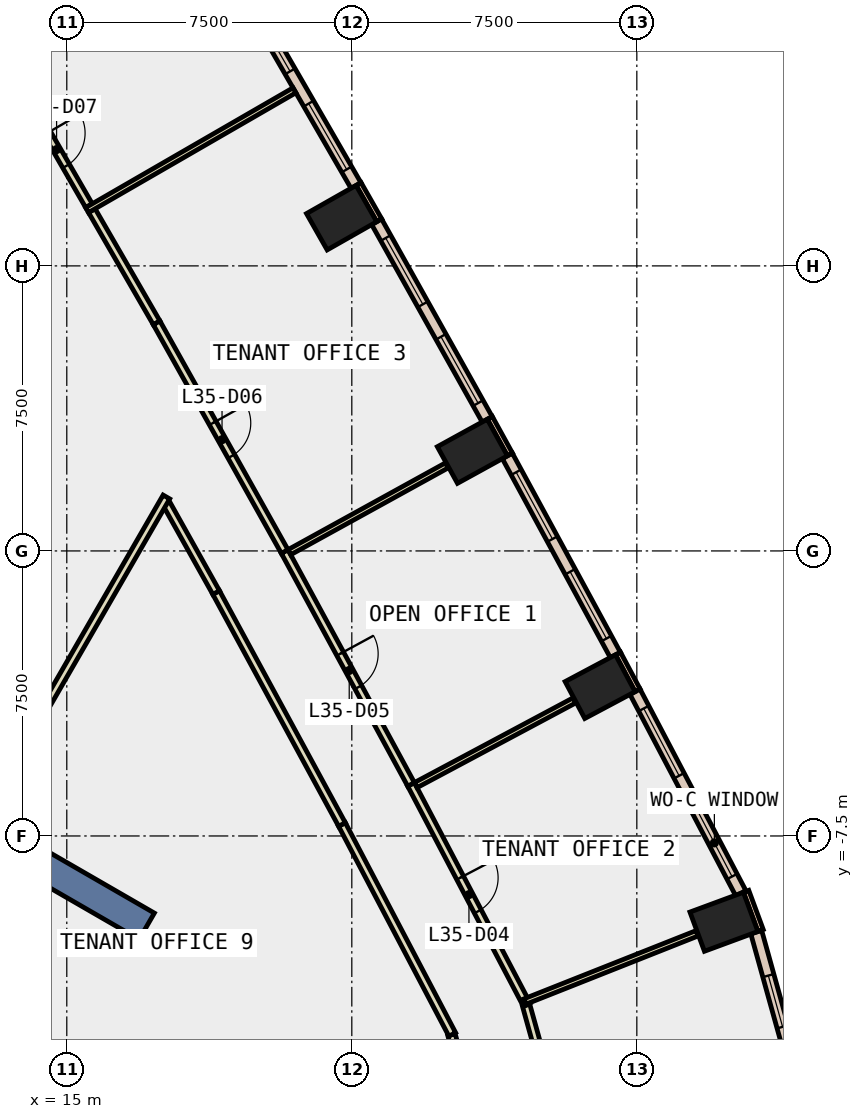
"""IFC4 building model, lengths in metres.
Left out: names, types, materials, properties, quantities, classifications, styles, units other than length and angle.
Written with IfcOpenShell. Run it as: python <this file> out.ifc"""

import sys

from ifc_helpers import new_model, si_unit, direction, frame, frame_2d, origin, origin_2d, place, context, subcontext, project, spatial, rectangle, extrude, element, fill, save


model = new_model("IFC4")
c1 = context("Model", 3, precision=1e-05, world=origin(), true_north=direction((0.0, 1.0)))
c2 = subcontext(c1, "Body", "Model", "MODEL_VIEW")
j1 = project(units=[si_unit("LENGTHUNIT", "METRE"), si_unit("PLANEANGLEUNIT", "RADIAN")], contexts=[c1])
p1 = place(None, origin())
s1 = spatial("IfcSite", under=j1, at=p1, CompositionType="ELEMENT")
p2 = place(p1, origin())
s2 = spatial("IfcBuilding", under=s1, at=p2, CompositionType="ELEMENT")
p3 = place(p2, frame((0.0, 0.0, 159.2)))
s3 = spatial("IfcBuildingStorey", under=s2, at=p3, CompositionType="ELEMENT", Elevation=159.2)
for number, where, z_axis, x_axis in (
    (1, (32.292, -9.758, -0.4), (0.0, 0.0, 1.0), (-0.347, 0.938, 0.0)),
    (2, (29.034, -3.571, -0.4), (0.0, 0.0, 1.0), (-0.47, 0.883, 0.0)),
    (3, (25.673, 2.622, -0.4), (0.0, 0.0, 1.0), (-0.482, 0.876, 0.0)),
    (4, (22.232, 8.769, -0.4), (0.0, 0.0, 1.0), (-0.494, 0.869, 0.0)),
):
    element("IfcColumn", number, at=place(p3, frame(where, z_axis=z_axis, x_axis=x_axis)), inside=s3, PredefinedType="COLUMN", context=c2, shape_type="SweptSolid", body=[
        extrude(rectangle(XDim=1.1, YDim=1.5, at=origin_2d()), origin(), (0.0, 0.0, 1.0), 4.2),
    ])
p4 = place(p3, frame((9.31, -5.375, -0.4), z_axis=(0.0, 0.0, 1.0), x_axis=(0.866017533419, -0.500013631625, 0.0)))
e5 = element("IfcWall", 5, at=p4, inside=s3, PredefinedType="SHEAR", context=c2, shape_type="SweptSolid", body=[
    extrude(rectangle(XDim=9.0, YDim=0.8, at=frame_2d((4.5, 0.0))), origin(), (0.0, 0.0, 1.0), 4.2),
])
for number, where, z_axis, x_axis in (
    (6, (33.256, -9.988, 0.0), (0.0, 0.0, 1.0), (-0.346, 0.938, 0.0)),
    (7, (30.02, -3.669, 0.0), (0.0, 0.0, 1.0), (-0.47, 0.883, 0.0)),
):
    element("IfcWall", number, at=place(p3, frame(where, z_axis=z_axis, x_axis=x_axis)), inside=s3, PredefinedType="STANDARD", context=c2, shape_type="SweptSolid", body=[
        extrude(rectangle(XDim=1.1, YDim=0.15, at=frame_2d((0.55, 0.0))), origin(), (0.0, 0.0, 1.0), 3.8),
    ])
for number, where, z_axis, x_axis in (
    (8, (26.661, 2.538, 0.0), (0.0, 0.0, 1.0), (-0.482, 0.876, 0.0)),
    (9, (23.222, 8.699, 0.0), (0.0, 0.0, 1.0), (-0.495, 0.869, 0.0)),
):
    element("IfcWall", number, at=place(p3, frame(where, z_axis=z_axis, x_axis=x_axis)), inside=s3, PredefinedType="STANDARD", context=c2, shape_type="SweptSolid", body=[
        extrude(rectangle(XDim=1.1, YDim=0.15, at=frame_2d((0.55, 0.0))), origin(), (0.0, 0.0, 1.0), 3.8),
    ])
p5 = place(p3, frame((34.154, -13.667, 0.0), z_axis=(0.0, 0.0, 1.0), x_axis=(-0.26799398221, 0.963420585985, 0.0)))
e10 = element("IfcWall", 10, at=p5, inside=s3, PredefinedType="STANDARD", context=c2, shape_type="SweptSolid", body=[
    extrude(rectangle(XDim=3.776, YDim=0.3, at=frame_2d((1.888, 0.0))), origin(), (0.0, 0.0, 1.0), 3.8),
])
p6 = place(p5, frame((1.188, 0.0, 0.9)))
e11 = element("IfcOpeningElement", 11, at=p6, cuts=e10, PredefinedType="OPENING", context=c2, shape_type="SweptSolid", body=[
    extrude(rectangle(XDim=1.4, YDim=2.6, at=frame_2d((0.7, 1.3))), frame((0.0, 0.16, 0.0), z_axis=(0.0, -1.0, 0.0), x_axis=(1.0, 0.0, 0.0)), (0.0, 0.0, 1.0), 0.32),
])
p7 = place(p3, frame((32.737, -9.008, 0.0), z_axis=(0.0, 0.0, 1.0), x_axis=(-0.465104650407, 0.885255705528, 0.0)))
e12 = element("IfcWall", 12, at=p7, inside=s3, PredefinedType="STANDARD", context=c2, shape_type="SweptSolid", body=[
    extrude(rectangle(XDim=5.99, YDim=0.3, at=frame_2d((2.995, 0.0))), origin(), (0.0, 0.0, 1.0), 3.8),
])
p8 = place(p7, frame((0.498, 0.0, 0.9)))
e13 = element("IfcOpeningElement", 13, at=p8, cuts=e12, PredefinedType="OPENING", context=c2, shape_type="SweptSolid", body=[
    extrude(rectangle(XDim=2.0, YDim=2.6, at=frame_2d((1.0, 1.3))), frame((0.0, 0.16, 0.0), z_axis=(0.0, -1.0, 0.0), x_axis=(1.0, 0.0, 0.0)), (0.0, 0.0, 1.0), 0.32),
])
p9 = place(p7, frame((3.493, 0.0, 0.9)))
e14 = element("IfcOpeningElement", 14, at=p9, cuts=e12, PredefinedType="OPENING", context=c2, shape_type="SweptSolid", body=[
    extrude(rectangle(XDim=2.0, YDim=2.6, at=frame_2d((1.0, 1.3))), frame((0.0, 0.16, 0.0), z_axis=(0.0, -1.0, 0.0), x_axis=(1.0, 0.0, 0.0)), (0.0, 0.0, 1.0), 0.32),
])
p10 = place(p3, frame((29.434, -2.736, 0.0), z_axis=(0.0, 0.0, 1.0), x_axis=(-0.476970695077, 0.878919197673, 0.0)))
e15 = element("IfcWall", 15, at=p10, inside=s3, PredefinedType="STANDARD", context=c2, shape_type="SweptSolid", body=[
    extrude(rectangle(XDim=5.958, YDim=0.3, at=frame_2d((2.979, 0.0))), origin(), (0.0, 0.0, 1.0), 3.8),
])
p11 = place(p10, frame((0.49, 0.0, 0.9)))
e16 = element("IfcOpeningElement", 16, at=p11, cuts=e15, PredefinedType="OPENING", context=c2, shape_type="SweptSolid", body=[
    extrude(rectangle(XDim=2.0, YDim=2.6, at=frame_2d((1.0, 1.3))), frame((0.0, 0.16, 0.0), z_axis=(0.0, -1.0, 0.0), x_axis=(1.0, 0.0, 0.0)), (0.0, 0.0, 1.0), 0.32),
])
p12 = place(p10, frame((3.469, 0.0, 0.9)))
e17 = element("IfcOpeningElement", 17, at=p12, cuts=e15, PredefinedType="OPENING", context=c2, shape_type="SweptSolid", body=[
    extrude(rectangle(XDim=2.0, YDim=2.6, at=frame_2d((1.0, 1.3))), frame((0.0, 0.16, 0.0), z_axis=(0.0, -1.0, 0.0), x_axis=(1.0, 0.0, 0.0)), (0.0, 0.0, 1.0), 0.32),
])
p13 = place(p3, frame((26.062, 3.463, 0.0), z_axis=(0.0, 0.0, 1.0), x_axis=(-0.488354983501, 0.872645065356, 0.0)))
e18 = element("IfcWall", 18, at=p13, inside=s3, PredefinedType="STANDARD", context=c2, shape_type="SweptSolid", body=[
    extrude(rectangle(XDim=5.957, YDim=0.3, at=frame_2d((2.978, 0.0))), origin(), (0.0, 0.0, 1.0), 3.8),
])
p14 = place(p13, frame((0.489, 0.0, 0.9)))
e19 = element("IfcOpeningElement", 19, at=p14, cuts=e18, PredefinedType="OPENING", context=c2, shape_type="SweptSolid", body=[
    extrude(rectangle(XDim=2.0, YDim=2.6, at=frame_2d((1.0, 1.3))), frame((0.0, 0.16, 0.0), z_axis=(0.0, -1.0, 0.0), x_axis=(1.0, 0.0, 0.0)), (0.0, 0.0, 1.0), 0.32),
])
p15 = place(p13, frame((3.467, 0.0, 0.9)))
e20 = element("IfcOpeningElement", 20, at=p15, cuts=e18, PredefinedType="OPENING", context=c2, shape_type="SweptSolid", body=[
    extrude(rectangle(XDim=2.0, YDim=2.6, at=frame_2d((1.0, 1.3))), frame((0.0, 0.16, 0.0), z_axis=(0.0, -1.0, 0.0), x_axis=(1.0, 0.0, 0.0)), (0.0, 0.0, 1.0), 0.32),
])
p16 = place(p3, frame((22.61, 9.615, 0.0), z_axis=(0.0, 0.0, 1.0), x_axis=(-0.500061823953, 0.865989706766, 0.0)))
e21 = element("IfcWall", 21, at=p16, inside=s3, PredefinedType="STANDARD", context=c2, shape_type="SweptSolid", body=[
    extrude(rectangle(XDim=5.957, YDim=0.3, at=frame_2d((2.979, 0.0))), origin(), (0.0, 0.0, 1.0), 3.8),
])
p17 = place(p16, frame((0.489, 0.0, 0.9)))
e22 = element("IfcOpeningElement", 22, at=p17, cuts=e21, PredefinedType="OPENING", context=c2, shape_type="SweptSolid", body=[
    extrude(rectangle(XDim=2.0, YDim=2.6, at=frame_2d((1.0, 1.3))), frame((0.0, 0.16, 0.0), z_axis=(0.0, -1.0, 0.0), x_axis=(1.0, 0.0, 0.0)), (0.0, 0.0, 1.0), 0.32),
])
p18 = place(p16, frame((3.468, 0.0, 0.9)))
e23 = element("IfcOpeningElement", 23, at=p18, cuts=e21, PredefinedType="OPENING", context=c2, shape_type="SweptSolid", body=[
    extrude(rectangle(XDim=2.0, YDim=2.6, at=frame_2d((1.0, 1.3))), frame((0.0, 0.16, 0.0), z_axis=(0.0, -1.0, 0.0), x_axis=(1.0, 0.0, 0.0)), (0.0, 0.0, 1.0), 0.32),
])
p19 = place(p3, frame((25.586, -14.393, 0.0), z_axis=(0.0, 0.0, 1.0), x_axis=(-0.268139825244, 0.963380005044, 0.0)))
e24 = element("IfcWall", 24, at=p19, inside=s3, PredefinedType="PARTITIONING", context=c2, shape_type="SweptSolid", body=[
    extrude(rectangle(XDim=1.726, YDim=0.2, at=frame_2d((0.863, 0.0))), origin(), (0.0, 0.0, 1.0), 3.8),
])
p20 = place(p3, frame((25.143, -12.722, 0.0), z_axis=(0.0, 0.0, 1.0), x_axis=(-0.465089990515, 0.885263407536, 0.0)))
e25 = element("IfcWall", 25, at=p20, inside=s3, PredefinedType="PARTITIONING", context=c2, shape_type="SweptSolid", body=[
    extrude(rectangle(XDim=6.24, YDim=0.2, at=frame_2d((3.12, 0.0))), origin(), (0.0, 0.0, 1.0), 3.8),
])
p21 = place(p3, frame((22.241, -7.198, 0.0), z_axis=(0.0, 0.0, 1.0), x_axis=(-0.476865268044, 0.878976402489, 0.0)))
e26 = element("IfcWall", 26, at=p21, inside=s3, PredefinedType="PARTITIONING", context=c2, shape_type="SweptSolid", body=[
    extrude(rectangle(XDim=6.943, YDim=0.2, at=frame_2d((3.472, 0.0))), origin(), (0.0, 0.0, 1.0), 3.8),
])
p22 = place(p3, frame((18.93, -1.095, 0.0), z_axis=(0.0, 0.0, 1.0), x_axis=(-0.488268004118, 0.872693735599, 0.0)))
e27 = element("IfcWall", 27, at=p22, inside=s3, PredefinedType="PARTITIONING", context=c2, shape_type="SweptSolid", body=[
    extrude(rectangle(XDim=2.683, YDim=0.2, at=frame_2d((1.341, 0.0))), origin(), (0.0, 0.0, 1.0), 3.8),
])
p23 = place(p3, frame((27.086, -11.952, 0.0), z_axis=(0.0, 0.0, 1.0), x_axis=(0.267909096687, -0.963444194498, 0.0)))
e28 = element("IfcWall", 28, at=p23, inside=s3, PredefinedType="PARTITIONING", context=c2, shape_type="SweptSolid", body=[
    extrude(rectangle(XDim=2.516, YDim=0.2, at=frame_2d((1.258, 0.0))), origin(), (0.0, 0.0, 1.0), 3.8),
])
p24 = place(p3, frame((24.059, -6.143, 0.0), z_axis=(0.0, 0.0, 1.0), x_axis=(0.464993808059, -0.885313932154, 0.0)))
e29 = element("IfcWall", 29, at=p24, inside=s3, PredefinedType="PARTITIONING", context=c2, shape_type="SweptSolid", body=[
    extrude(rectangle(XDim=6.552, YDim=0.2, at=frame_2d((3.276, 0.0))), origin(), (0.0, 0.0, 1.0), 3.8),
])
p25 = place(p24, frame((2.776, 0.0, 0.0)))
e30 = element("IfcOpeningElement", 30, at=p25, cuts=e29, PredefinedType="OPENING", context=c2, shape_type="SweptSolid", body=[
    extrude(rectangle(XDim=1.0, YDim=2.1, at=frame_2d((0.5, 1.05))), frame((0.0, 0.11, 0.0), z_axis=(0.0, -1.0, 0.0), x_axis=(1.0, 0.0, 0.0)), (0.0, 0.0, 1.0), 0.22),
])
p26 = place(p3, frame((20.733, -0.016, 0.0), z_axis=(0.0, 0.0, 1.0), x_axis=(0.477104227839, -0.87884671916, 0.0)))
e31 = element("IfcWall", 31, at=p26, inside=s3, PredefinedType="PARTITIONING", context=c2, shape_type="SweptSolid", body=[
    extrude(rectangle(XDim=6.972, YDim=0.2, at=frame_2d((3.486, 0.0))), origin(), (0.0, 0.0, 1.0), 3.8),
])
p27 = place(p26, frame((3.061, 0.0, 0.0)))
e32 = element("IfcOpeningElement", 32, at=p27, cuts=e31, PredefinedType="OPENING", context=c2, shape_type="SweptSolid", body=[
    extrude(rectangle(XDim=1.0, YDim=2.1, at=frame_2d((0.5, 1.05))), frame((0.0, 0.11, 0.0), z_axis=(0.0, -1.0, 0.0), x_axis=(1.0, 0.0, 0.0)), (0.0, 0.0, 1.0), 0.22),
])
p28 = place(p3, frame((15.659, 8.954, 0.0), z_axis=(0.0, 0.0, 1.0), x_axis=(0.50001992892, -0.866013897511, 0.0)))
e33 = element("IfcWall", 33, at=p28, inside=s3, PredefinedType="PARTITIONING", context=c2, shape_type="SweptSolid", body=[
    extrude(rectangle(XDim=3.41, YDim=0.2, at=frame_2d((1.705, 0.0))), origin(), (0.0, 0.0, 1.0), 3.8),
])
p29 = place(p3, frame((17.364, 6.001, 0.0), z_axis=(0.0, 0.0, 1.0), x_axis=(0.488528981592, -0.872547668695, 0.0)))
e34 = element("IfcWall", 34, at=p29, inside=s3, PredefinedType="PARTITIONING", context=c2, shape_type="SweptSolid", body=[
    extrude(rectangle(XDim=6.896, YDim=0.2, at=frame_2d((3.448, 0.0))), origin(), (0.0, 0.0, 1.0), 3.8),
])
p30 = place(p29, frame((3.023, 0.0, 0.0)))
e35 = element("IfcOpeningElement", 35, at=p30, cuts=e34, PredefinedType="OPENING", context=c2, shape_type="SweptSolid", body=[
    extrude(rectangle(XDim=1.0, YDim=2.1, at=frame_2d((0.5, 1.05))), frame((0.0, 0.11, 0.0), z_axis=(0.0, -1.0, 0.0), x_axis=(1.0, 0.0, 0.0)), (0.0, 0.0, 1.0), 0.22),
])
p31 = place(p3, frame((13.879, 12.037, 0.0), z_axis=(0.0, 0.0, 1.0), x_axis=(0.50001992892, -0.866013897511, 0.0)))
e36 = element("IfcWall", 36, at=p31, inside=s3, PredefinedType="PARTITIONING", context=c2, shape_type="SweptSolid", body=[
    extrude(rectangle(XDim=3.41, YDim=0.2, at=frame_2d((1.705, 0.0))), origin(), (0.0, 0.0, 1.0), 3.8),
])
p32 = place(p31, frame((1.205, 0.0, 0.0)))
e37 = element("IfcOpeningElement", 37, at=p32, cuts=e36, PredefinedType="OPENING", context=c2, shape_type="SweptSolid", body=[
    extrude(rectangle(XDim=1.0, YDim=2.1, at=frame_2d((0.5, 1.05))), frame((0.0, 0.11, 0.0), z_axis=(0.0, -1.0, 0.0), x_axis=(1.0, 0.0, 0.0)), (0.0, 0.0, 1.0), 0.22),
])
p33 = place(p3, frame((17.621, 1.42, 0.0), z_axis=(0.0, 0.0, 1.0), x_axis=(-0.499987708133, -0.866032500381, 0.0)))
e38 = element("IfcWall", 38, at=p33, inside=s3, PredefinedType="PARTITIONING", context=c2, shape_type="SweptSolid", body=[
    extrude(rectangle(XDim=9.64, YDim=0.2, at=frame_2d((4.82, 0.0))), origin(), (0.0, 0.0, 1.0), 3.8),
])
p34 = place(p3, frame((27.059, -11.855, 0.0), z_axis=(0.0, 0.0, 1.0), x_axis=(0.92964843089, 0.368447818481, 0.0)))
e39 = element("IfcWall", 39, at=p34, inside=s3, PredefinedType="PARTITIONING", context=c2, shape_type="SweptSolid", body=[
    extrude(rectangle(XDim=4.866, YDim=0.15, at=frame_2d((2.433, 0.0))), origin(), (0.0, 0.0, 1.0), 3.8),
])
p35 = place(p3, frame((24.182, -6.162, 0.0), z_axis=(0.0, 0.0, 1.0), x_axis=(0.88214427755, 0.470979270866, 0.0)))
e40 = element("IfcWall", 40, at=p35, inside=s3, PredefinedType="PARTITIONING", context=c2, shape_type="SweptSolid", body=[
    extrude(rectangle(XDim=4.731, YDim=0.15, at=frame_2d((2.365, 0.0))), origin(), (0.0, 0.0, 1.0), 3.8),
])
p36 = place(p3, frame((20.857, -0.033, 0.0), z_axis=(0.0, 0.0, 1.0), x_axis=(0.875786153174, 0.482699299677, 0.0)))
e41 = element("IfcWall", 41, at=p36, inside=s3, PredefinedType="PARTITIONING", context=c2, shape_type="SweptSolid", body=[
    extrude(rectangle(XDim=4.729, YDim=0.15, at=frame_2d((2.365, 0.0))), origin(), (0.0, 0.0, 1.0), 3.8),
])
p37 = place(p3, frame((15.535, 8.969, 0.0), z_axis=(0.0, 0.0, 1.0), x_axis=(0.865951968193, 0.500127172609, 0.0)))
e42 = element("IfcWall", 42, at=p37, inside=s3, PredefinedType="PARTITIONING", context=c2, shape_type="SweptSolid", body=[
    extrude(rectangle(XDim=6.301, YDim=0.15, at=frame_2d((3.15, 0.0))), origin(), (0.0, 0.0, 1.0), 3.8),
])
p38 = place(p6, origin())
e43 = element("IfcWindow", 43, at=p38, inside=s3, PartitioningType="SINGLE_PANEL", PredefinedType="WINDOW", context=c2, shape_type="SweptSolid", body=[
    extrude(rectangle(XDim=1.4, YDim=2.6, at=frame_2d((0.7, 1.3))), frame((0.0, 0.03, 0.0), z_axis=(0.0, -1.0, 0.0), x_axis=(1.0, 0.0, 0.0)), (0.0, 0.0, 1.0), 0.06),
])
fill(e11, e43)
p39 = place(p8, origin())
e44 = element("IfcWindow", 44, at=p39, inside=s3, PartitioningType="SINGLE_PANEL", PredefinedType="WINDOW", context=c2, shape_type="SweptSolid", body=[
    extrude(rectangle(XDim=2.0, YDim=2.6, at=frame_2d((1.0, 1.3))), frame((0.0, 0.03, 0.0), z_axis=(0.0, -1.0, 0.0), x_axis=(1.0, 0.0, 0.0)), (0.0, 0.0, 1.0), 0.06),
])
fill(e13, e44)
p40 = place(p9, origin())
e45 = element("IfcWindow", 45, at=p40, inside=s3, PartitioningType="SINGLE_PANEL", PredefinedType="WINDOW", context=c2, shape_type="SweptSolid", body=[
    extrude(rectangle(XDim=2.0, YDim=2.6, at=frame_2d((1.0, 1.3))), frame((0.0, 0.03, 0.0), z_axis=(0.0, -1.0, 0.0), x_axis=(1.0, 0.0, 0.0)), (0.0, 0.0, 1.0), 0.06),
])
fill(e14, e45)
p41 = place(p11, origin())
e46 = element("IfcWindow", 46, at=p41, inside=s3, PartitioningType="SINGLE_PANEL", PredefinedType="WINDOW", context=c2, shape_type="SweptSolid", body=[
    extrude(rectangle(XDim=2.0, YDim=2.6, at=frame_2d((1.0, 1.3))), frame((0.0, 0.03, 0.0), z_axis=(0.0, -1.0, 0.0), x_axis=(1.0, 0.0, 0.0)), (0.0, 0.0, 1.0), 0.06),
])
fill(e16, e46)
p42 = place(p12, origin())
e47 = element("IfcWindow", 47, at=p42, inside=s3, PartitioningType="SINGLE_PANEL", PredefinedType="WINDOW", context=c2, shape_type="SweptSolid", body=[
    extrude(rectangle(XDim=2.0, YDim=2.6, at=frame_2d((1.0, 1.3))), frame((0.0, 0.03, 0.0), z_axis=(0.0, -1.0, 0.0), x_axis=(1.0, 0.0, 0.0)), (0.0, 0.0, 1.0), 0.06),
])
fill(e17, e47)
p43 = place(p14, origin())
e48 = element("IfcWindow", 48, at=p43, inside=s3, PartitioningType="SINGLE_PANEL", PredefinedType="WINDOW", context=c2, shape_type="SweptSolid", body=[
    extrude(rectangle(XDim=2.0, YDim=2.6, at=frame_2d((1.0, 1.3))), frame((0.0, 0.03, 0.0), z_axis=(0.0, -1.0, 0.0), x_axis=(1.0, 0.0, 0.0)), (0.0, 0.0, 1.0), 0.06),
])
fill(e19, e48)
p44 = place(p15, origin())
e49 = element("IfcWindow", 49, at=p44, inside=s3, PartitioningType="SINGLE_PANEL", PredefinedType="WINDOW", context=c2, shape_type="SweptSolid", body=[
    extrude(rectangle(XDim=2.0, YDim=2.6, at=frame_2d((1.0, 1.3))), frame((0.0, 0.03, 0.0), z_axis=(0.0, -1.0, 0.0), x_axis=(1.0, 0.0, 0.0)), (0.0, 0.0, 1.0), 0.06),
])
fill(e20, e49)
p45 = place(p17, origin())
e50 = element("IfcWindow", 50, at=p45, inside=s3, PartitioningType="SINGLE_PANEL", PredefinedType="WINDOW", context=c2, shape_type="SweptSolid", body=[
    extrude(rectangle(XDim=2.0, YDim=2.6, at=frame_2d((1.0, 1.3))), frame((0.0, 0.03, 0.0), z_axis=(0.0, -1.0, 0.0), x_axis=(1.0, 0.0, 0.0)), (0.0, 0.0, 1.0), 0.06),
])
fill(e22, e50)
p46 = place(p18, origin())
e51 = element("IfcWindow", 51, at=p46, inside=s3, PartitioningType="SINGLE_PANEL", PredefinedType="WINDOW", context=c2, shape_type="SweptSolid", body=[
    extrude(rectangle(XDim=2.0, YDim=2.6, at=frame_2d((1.0, 1.3))), frame((0.0, 0.03, 0.0), z_axis=(0.0, -1.0, 0.0), x_axis=(1.0, 0.0, 0.0)), (0.0, 0.0, 1.0), 0.06),
])
fill(e23, e51)
p47 = place(p25, origin())
e52 = element("IfcDoor", 52, at=p47, inside=s3, OperationType="SINGLE_SWING_LEFT", PredefinedType="DOOR", context=c2, shape_type="SweptSolid", body=[
    extrude(rectangle(XDim=1.0, YDim=2.1, at=frame_2d((0.5, 1.05))), frame((0.0, 0.025, 0.0), z_axis=(0.0, -1.0, 0.0), x_axis=(1.0, 0.0, 0.0)), (0.0, 0.0, 1.0), 0.05),
])
fill(e30, e52)
p48 = place(p27, origin())
e53 = element("IfcDoor", 53, at=p48, inside=s3, OperationType="SINGLE_SWING_LEFT", PredefinedType="DOOR", context=c2, shape_type="SweptSolid", body=[
    extrude(rectangle(XDim=1.0, YDim=2.1, at=frame_2d((0.5, 1.05))), frame((0.0, 0.025, 0.0), z_axis=(0.0, -1.0, 0.0), x_axis=(1.0, 0.0, 0.0)), (0.0, 0.0, 1.0), 0.05),
])
fill(e32, e53)
p49 = place(p30, origin())
e54 = element("IfcDoor", 54, at=p49, inside=s3, OperationType="SINGLE_SWING_LEFT", PredefinedType="DOOR", context=c2, shape_type="SweptSolid", body=[
    extrude(rectangle(XDim=1.0, YDim=2.1, at=frame_2d((0.5, 1.05))), frame((0.0, 0.025, 0.0), z_axis=(0.0, -1.0, 0.0), x_axis=(1.0, 0.0, 0.0)), (0.0, 0.0, 1.0), 0.05),
])
fill(e35, e54)
p50 = place(p32, origin())
e55 = element("IfcDoor", 55, at=p50, inside=s3, OperationType="SINGLE_SWING_LEFT", PredefinedType="DOOR", context=c2, shape_type="SweptSolid", body=[
    extrude(rectangle(XDim=1.0, YDim=2.1, at=frame_2d((0.5, 1.05))), frame((0.0, 0.025, 0.0), z_axis=(0.0, -1.0, 0.0), x_axis=(1.0, 0.0, 0.0)), (0.0, 0.0, 1.0), 0.05),
])
fill(e37, e55)
save(model, sys.argv[1])
